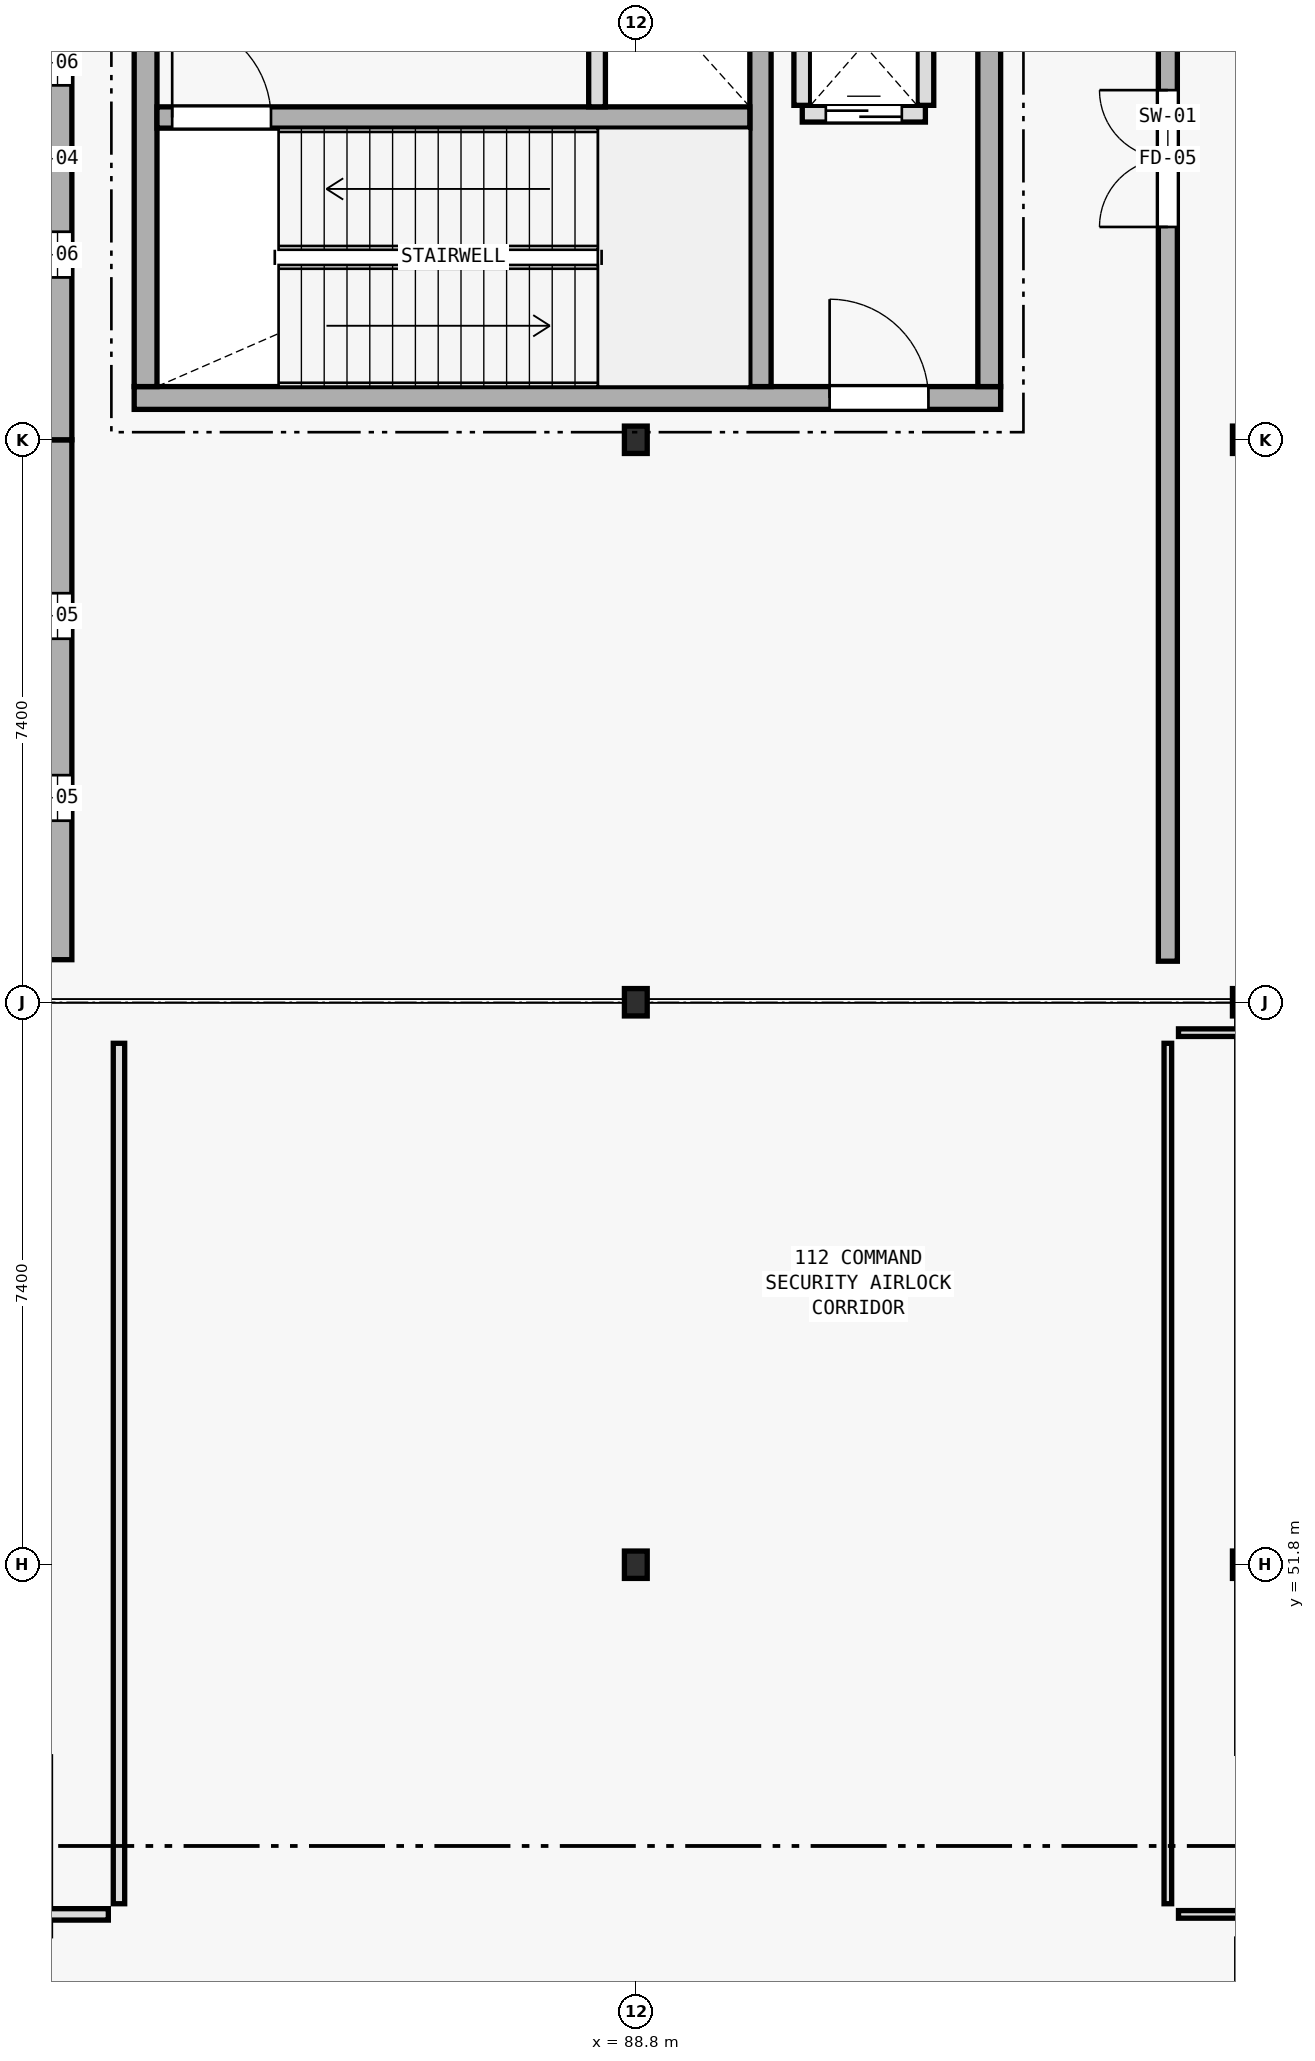
"""IFC4 building model, lengths in metres.
Left out: names, types, materials, properties, quantities, classifications, styles, units other than length and angle.
Written with IfcOpenShell. Run it as: python <this file> out.ifc"""

import sys

from ifc_helpers import new_model, si_unit, direction, frame, frame_2d, origin, origin_2d, place, context, subcontext, project, spatial, rectangle, i_section, extrude, element, fill, save


model = new_model("IFC4")
c1 = context("Model", 3, precision=1e-05, world=origin(), true_north=direction((0.0, 1.0)))
c2 = subcontext(c1, "Body", "Model", "MODEL_VIEW")
j1 = project(units=[si_unit("LENGTHUNIT", "METRE"), si_unit("PLANEANGLEUNIT", "RADIAN")], contexts=[c1])
p1 = place(None, origin())
s1 = spatial("IfcSite", under=j1, at=p1, CompositionType="ELEMENT")
p2 = place(p1, origin())
s2 = spatial("IfcBuilding", under=s1, at=p2, CompositionType="ELEMENT")
p3 = place(p2, frame((0.0, 0.0, 18.1)))
s3 = spatial("IfcBuildingStorey", under=s2, at=p3, CompositionType="ELEMENT", Elevation=18.1)
p4 = place(p3, frame((82.2, 67.15, 0.0), z_axis=(0.0, 0.0, 1.0), x_axis=(1.0, 0.0, 0.0)))
e1 = element("IfcWall", 1, at=p4, inside=s3, PredefinedType="SHEAR", context=c2, shape_type="SweptSolid", body=[
    extrude(rectangle(XDim=11.4, YDim=0.3, at=frame_2d((5.7, 0.0))), origin(), (0.0, 0.0, 1.0), 5.195),
])
p5 = place(p4, frame((9.15, 0.0, 0.0)))
e2 = element("IfcOpeningElement", 2, at=p5, cuts=e1, PredefinedType="OPENING", context=c2, shape_type="SweptSolid", body=[
    extrude(rectangle(XDim=1.3, YDim=2.2, at=frame_2d((0.65, 1.1))), frame((0.0, 0.16, 0.0), z_axis=(0.0, -1.0, 0.0), x_axis=(1.0, 0.0, 0.0)), (0.0, 0.0, 1.0), 0.32),
])
for number, where, z_axis, x_axis in (
    (3, (82.35, 67.3, 0.0), (0.0, 0.0, 1.0), (0.0, 1.0, 0.0)),
    (4, (93.45, 67.3, 0.0), (0.0, 0.0, 1.0), (0.0, 1.0, 0.0)),
):
    element("IfcWall", number, at=place(p3, frame(where, z_axis=z_axis, x_axis=x_axis)), inside=s3, PredefinedType="SHEAR", context=c2, shape_type="SweptSolid", body=[
        extrude(rectangle(XDim=5.8, YDim=0.3, at=frame_2d((2.9, 0.0))), origin(), (0.0, 0.0, 1.0), 5.195),
    ])
p6 = place(p3, frame((90.44, 67.3, 0.0), z_axis=(0.0, 0.0, 1.0), x_axis=(0.0, 1.0, 0.0)))
e5 = element("IfcWall", 5, at=p6, inside=s3, PredefinedType="SHEAR", context=c2, shape_type="SweptSolid", body=[
    extrude(rectangle(XDim=5.8, YDim=0.28, at=frame_2d((2.9, 0.0))), origin(), (0.0, 0.0, 1.0), 5.195),
])
p7 = place(p3, frame((82.5, 70.84, 0.0), z_axis=(0.0, 0.0, 1.0), x_axis=(1.0, 0.0, 0.0)))
e6 = element("IfcWall", 6, at=p7, inside=s3, PredefinedType="SHEAR", context=c2, shape_type="SweptSolid", body=[
    extrude(rectangle(XDim=7.8, YDim=0.28, at=frame_2d((3.9, 0.0))), origin(), (0.0, 0.0, 1.0), 5.195),
])
p8 = place(p7, frame((0.2, 0.0, 0.0)))
e7 = element("IfcOpeningElement", 7, at=p8, cuts=e6, PredefinedType="OPENING", context=c2, shape_type="SweptSolid", body=[
    extrude(rectangle(XDim=1.3, YDim=2.2, at=frame_2d((0.65, 1.1))), frame((0.0, 0.15, 0.0), z_axis=(0.0, -1.0, 0.0), x_axis=(1.0, 0.0, 0.0)), (0.0, 0.0, 1.0), 0.3),
])
for number, where, z_axis, x_axis in (
    (8, (88.8, 51.8, 0.0), (0.0, 0.0, 1.0), (1.0, 0.0, 0.0)),
    (9, (88.8, 59.2, 0.0), (0.0, 0.0, 1.0), (1.0, 0.0, 0.0)),
    (10, (88.8, 66.6, 0.0), (0.0, 0.0, 1.0), (1.0, 0.0, 0.0)),
    (11, (96.8, 51.8, 0.0), (0.0, 0.0, 1.0), (1.0, 0.0, 0.0)),
    (12, (96.8, 59.2, 0.0), (0.0, 0.0, 1.0), (1.0, 0.0, 0.0)),
    (13, (96.8, 66.6, 0.0), (0.0, 0.0, 1.0), (1.0, 0.0, 0.0)),
):
    element("IfcColumn", number, at=place(p3, frame(where, z_axis=z_axis, x_axis=x_axis)), inside=s3, PredefinedType="COLUMN", context=c2, shape_type="SweptSolid", body=[
        extrude(i_section(OverallWidth=0.3, OverallDepth=0.36, WebThickness=0.012, FlangeThickness=0.022, FilletRadius=0.027, at=origin_2d()), origin(), (0.0, 0.0, 1.0), 5.2),
    ])
p9 = place(p3, frame((81.09, 59.76, 0.0), z_axis=(0.0, 0.0, 1.0), x_axis=(0.0, 1.0, 0.0)))
e14 = element("IfcWall", 14, at=p9, inside=s3, PredefinedType="STANDARD", context=c2, shape_type="SweptSolid", body=[
    extrude(rectangle(XDim=6.84, YDim=0.58, at=frame_2d((3.42, 0.0))), origin(), (0.0, 0.0, 1.0), 4.98),
])
p10 = place(p9, frame((1.828, 0.0, 0.9)))
e15 = element("IfcOpeningElement", 15, at=p10, cuts=e14, PredefinedType="OPENING", context=c2, shape_type="SweptSolid", body=[
    extrude(rectangle(XDim=0.6, YDim=2.2, at=frame_2d((0.3, 1.1))), frame((0.0, 0.3, 0.0), z_axis=(0.0, -1.0, 0.0), x_axis=(1.0, 0.0, 0.0)), (0.0, 0.0, 1.0), 0.6),
])
p11 = place(p9, frame((4.222, 0.0, 0.9)))
e16 = element("IfcOpeningElement", 16, at=p11, cuts=e14, PredefinedType="OPENING", context=c2, shape_type="SweptSolid", body=[
    extrude(rectangle(XDim=0.6, YDim=2.2, at=frame_2d((0.3, 1.1))), frame((0.0, 0.3, 0.0), z_axis=(0.0, -1.0, 0.0), x_axis=(1.0, 0.0, 0.0)), (0.0, 0.0, 1.0), 0.6),
])
p12 = place(p3, frame((81.09, 66.6, 0.0), z_axis=(0.0, 0.0, 1.0), x_axis=(0.0, 1.0, 0.0)))
e17 = element("IfcWall", 17, at=p12, inside=s3, PredefinedType="STANDARD", context=c2, shape_type="SweptSolid", body=[
    extrude(rectangle(XDim=7.4, YDim=0.58, at=frame_2d((3.7, 0.0))), origin(), (0.0, 0.0, 1.0), 4.98),
])
p13 = place(p12, frame((2.136, 0.0, 0.9)))
e18 = element("IfcOpeningElement", 18, at=p13, cuts=e17, PredefinedType="OPENING", context=c2, shape_type="SweptSolid", body=[
    extrude(rectangle(XDim=0.6, YDim=2.6, at=frame_2d((0.3, 1.3))), frame((0.0, 0.3, 0.0), z_axis=(0.0, -1.0, 0.0), x_axis=(1.0, 0.0, 0.0)), (0.0, 0.0, 1.0), 0.6),
])
p14 = place(p12, frame((4.664, 0.0, 0.9)))
e19 = element("IfcOpeningElement", 19, at=p14, cuts=e17, PredefinedType="OPENING", context=c2, shape_type="SweptSolid", body=[
    extrude(rectangle(XDim=0.6, YDim=2.6, at=frame_2d((0.3, 1.3))), frame((0.0, 0.3, 0.0), z_axis=(0.0, -1.0, 0.0), x_axis=(1.0, 0.0, 0.0)), (0.0, 0.0, 1.0), 0.6),
])
p15 = place(p3, frame((90.99, 70.89, 0.0), z_axis=(0.0, 0.0, 1.0), x_axis=(1.0, 0.0, 0.0)))
e20 = element("IfcWall", 20, at=p15, inside=s3, PredefinedType="PLUMBINGWALL", context=c2, shape_type="SweptSolid", body=[
    extrude(rectangle(XDim=1.62, YDim=0.22, at=frame_2d((0.81, 0.0))), origin(), (0.0, 0.0, 1.0), 4.98),
])
p16 = place(p15, frame((0.31, 0.0, 0.0)))
e21 = element("IfcOpeningElement", 21, at=p16, cuts=e20, PredefinedType="OPENING", context=c2, shape_type="SweptSolid", body=[
    extrude(rectangle(XDim=1.0, YDim=2.2, at=frame_2d((0.5, 1.1))), frame((0.0, 0.12, 0.0), z_axis=(0.0, -1.0, 0.0), x_axis=(1.0, 0.0, 0.0)), (0.0, 0.0, 1.0), 0.24),
])
for number, where, z_axis, x_axis in (
    (22, (90.99, 71.0, 0.0), (0.0, 0.0, 1.0), (0.0, 1.0, 0.0)),
    (23, (92.61, 71.0, 0.0), (0.0, 0.0, 1.0), (0.0, 1.0, 0.0)),
):
    element("IfcWall", number, at=place(p3, frame(where, z_axis=z_axis, x_axis=x_axis)), inside=s3, PredefinedType="PLUMBINGWALL", context=c2, shape_type="SweptSolid", body=[
        extrude(rectangle(XDim=1.6, YDim=0.22, at=frame_2d((0.8, 0.0))), origin(), (0.0, 0.0, 1.0), 4.98),
    ])
p17 = place(p3, frame((88.29, 70.98, 0.0), z_axis=(0.0, 0.0, 1.0), x_axis=(0.0, 1.0, 0.0)))
e24 = element("IfcWall", 24, at=p17, inside=s3, PredefinedType="PLUMBINGWALL", context=c2, shape_type="SweptSolid", body=[
    extrude(rectangle(XDim=2.12, YDim=0.22, at=frame_2d((1.06, 0.0))), origin(), (0.0, 0.0, 1.0), 4.98),
])
p18 = place(p3, frame((95.8, 59.74, 0.0), z_axis=(0.0, 0.0, 1.0), x_axis=(0.0, 1.0, 0.0)))
e25 = element("IfcWall", 25, at=p18, inside=s3, PredefinedType="SOLIDWALL", context=c2, shape_type="SweptSolid", body=[
    extrude(rectangle(XDim=21.12, YDim=0.25, at=frame_2d((10.56, 0.0))), origin(), (0.0, 0.0, 1.0), 4.51),
])
p19 = place(p18, frame((9.66, 0.0, 0.0)))
e26 = element("IfcOpeningElement", 26, at=p19, cuts=e25, PredefinedType="OPENING", context=c2, shape_type="SweptSolid", body=[
    extrude(rectangle(XDim=1.8, YDim=2.2, at=frame_2d((0.9, 1.1))), frame((0.0, 0.135, 0.0), z_axis=(0.0, -1.0, 0.0), x_axis=(1.0, 0.0, 0.0)), (0.0, 0.0, 1.0), 0.27),
])
p20 = place(p3, frame((54.14, 47.2, 0.0), z_axis=(0.0, 0.0, 1.0), x_axis=(1.0, 0.0, 0.0)))
e27 = element("IfcWall", 27, at=p20, inside=s3, PredefinedType="PARTITIONING", context=c2, shape_type="SweptSolid", body=[
    extrude(rectangle(XDim=27.72, YDim=0.15, at=frame_2d((13.86, 0.0))), origin(), (0.0, 0.0, 1.0), 4.51),
])
p21 = place(p20, frame((13.16, 0.0, 0.0)))
e28 = element("IfcOpeningElement", 28, at=p21, cuts=e27, PredefinedType="OPENING", context=c2, shape_type="SweptSolid", body=[
    extrude(rectangle(XDim=1.4, YDim=2.2, at=frame_2d((0.7, 1.1))), frame((0.0, 0.085, 0.0), z_axis=(0.0, -1.0, 0.0), x_axis=(1.0, 0.0, 0.0)), (0.0, 0.0, 1.0), 0.17),
])
p22 = place(p3, frame((82.0, 47.34, 0.0), z_axis=(0.0, 0.0, 1.0), x_axis=(0.0, 1.0, 0.0)))
e29 = element("IfcWall", 29, at=p22, inside=s3, PredefinedType="PARTITIONING", context=c2, shape_type="SweptSolid", body=[
    extrude(rectangle(XDim=11.32, YDim=0.15, at=frame_2d((5.66, 0.0))), origin(), (0.0, 0.0, 1.0), 4.51),
])
p23 = place(p3, frame((95.94, 47.2, 0.0), z_axis=(0.0, 0.0, 1.0), x_axis=(1.0, 0.0, 0.0)))
e30 = element("IfcWall", 30, at=p23, inside=s3, PredefinedType="PARTITIONING", context=c2, shape_type="SweptSolid", body=[
    extrude(rectangle(XDim=16.32, YDim=0.1, at=frame_2d((8.16, 0.0))), origin(), (0.0, 0.0, 1.0), 4.4),
])
p24 = place(p23, frame((7.46, 0.0, 0.0)))
e31 = element("IfcOpeningElement", 31, at=p24, cuts=e30, PredefinedType="OPENING", context=c2, shape_type="SweptSolid", body=[
    extrude(rectangle(XDim=1.4, YDim=2.2, at=frame_2d((0.7, 1.1))), frame((0.0, 0.06, 0.0), z_axis=(0.0, -1.0, 0.0), x_axis=(1.0, 0.0, 0.0)), (0.0, 0.0, 1.0), 0.12),
])
p25 = place(p3, frame((95.94, 58.8, 0.0), z_axis=(0.0, 0.0, 1.0), x_axis=(1.0, 0.0, 0.0)))
e32 = element("IfcWall", 32, at=p25, inside=s3, PredefinedType="PARTITIONING", context=c2, shape_type="SweptSolid", body=[
    extrude(rectangle(XDim=16.32, YDim=0.1, at=frame_2d((8.16, 0.0))), origin(), (0.0, 0.0, 1.0), 4.4),
])
p26 = place(p3, frame((95.8, 47.34, 0.0), z_axis=(0.0, 0.0, 1.0), x_axis=(0.0, 1.0, 0.0)))
e33 = element("IfcWall", 33, at=p26, inside=s3, PredefinedType="PARTITIONING", context=c2, shape_type="SweptSolid", body=[
    extrude(rectangle(XDim=11.32, YDim=0.1, at=frame_2d((5.66, 0.0))), origin(), (0.0, 0.0, 1.0), 4.4),
])
p27 = place(p8, origin())
e34 = element("IfcDoor", 34, at=p27, inside=s3, OperationType="SINGLE_SWING_LEFT", PredefinedType="DOOR", context=c2, shape_type="SweptSolid", body=[
    extrude(rectangle(XDim=1.3, YDim=2.2, at=frame_2d((0.65, 1.1))), frame((0.0, 0.025, 0.0), z_axis=(0.0, -1.0, 0.0), x_axis=(1.0, 0.0, 0.0)), (0.0, 0.0, 1.0), 0.05),
])
fill(e7, e34)
p28 = place(p16, origin())
e35 = element("IfcDoor", 35, at=p28, inside=s3, OperationType="DOUBLE_DOOR_SLIDING", PredefinedType="DOOR", context=c2, shape_type="SweptSolid", body=[
    extrude(rectangle(XDim=1.0, YDim=2.2, at=frame_2d((0.5, 1.1))), frame((0.0, 0.025, 0.0), z_axis=(0.0, -1.0, 0.0), x_axis=(1.0, 0.0, 0.0)), (0.0, 0.0, 1.0), 0.05),
])
fill(e21, e35)
p29 = place(p5, origin())
e36 = element("IfcDoor", 36, at=p29, inside=s3, OperationType="SINGLE_SWING_LEFT", PredefinedType="DOOR", context=c2, shape_type="SweptSolid", body=[
    extrude(rectangle(XDim=1.3, YDim=2.2, at=frame_2d((0.65, 1.1))), frame((0.0, 0.025, 0.0), z_axis=(0.0, -1.0, 0.0), x_axis=(1.0, 0.0, 0.0)), (0.0, 0.0, 1.0), 0.05),
])
fill(e2, e36)
p30 = place(p19, origin())
e37 = element("IfcDoor", 37, at=p30, inside=s3, OperationType="DOUBLE_DOOR_SINGLE_SWING", PredefinedType="DOOR", context=c2, shape_type="SweptSolid", body=[
    extrude(rectangle(XDim=1.8, YDim=2.2, at=frame_2d((0.9, 1.1))), frame((0.0, 0.025, 0.0), z_axis=(0.0, -1.0, 0.0), x_axis=(1.0, 0.0, 0.0)), (0.0, 0.0, 1.0), 0.05),
])
fill(e26, e37)
save(model, sys.argv[1])
